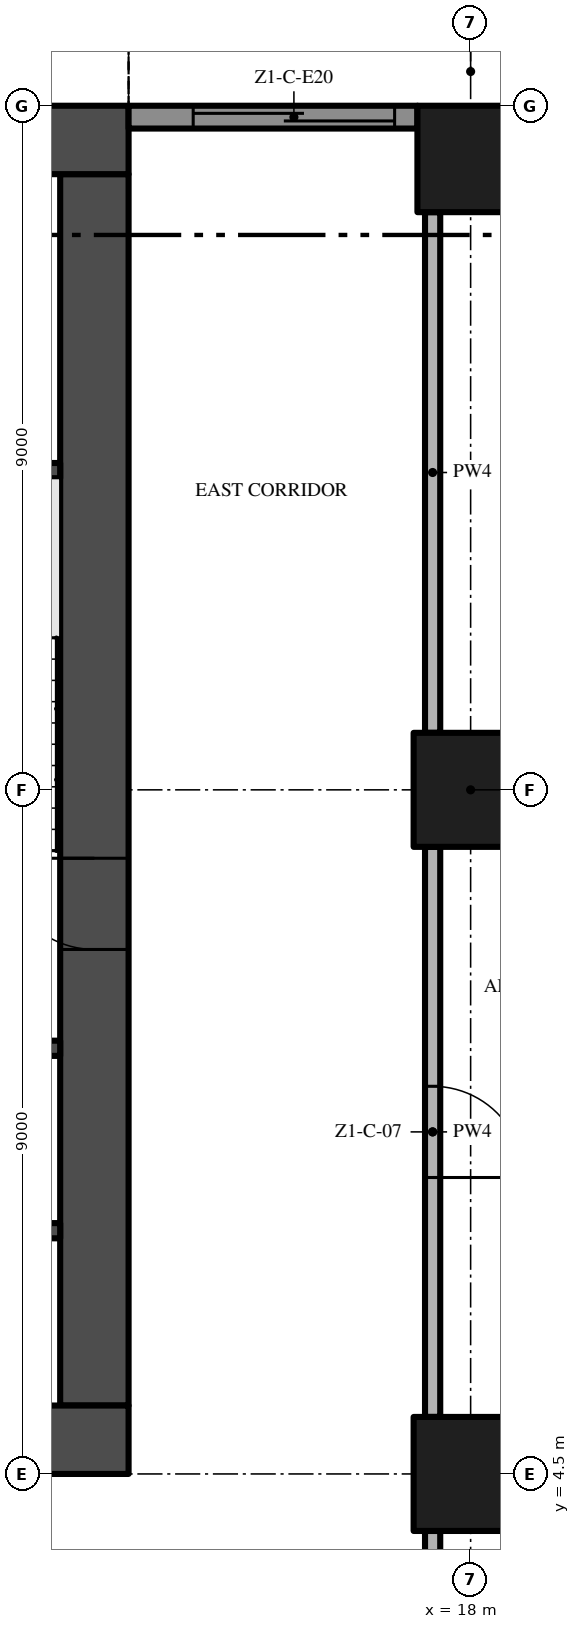
"""IFC4 building model, lengths in metres.
Left out: names, types, materials, properties, quantities, classifications, styles, units other than length and angle.
Written with IfcOpenShell. Run it as: python <this file> out.ifc"""

import sys

from ifc_helpers import new_model, si_unit, direction, frame, frame_2d, origin, origin_2d, place, context, subcontext, project, spatial, rectangle, extrude, element, fill, save


model = new_model("IFC4")
c1 = context("Model", 3, precision=1e-05, world=origin(), true_north=direction((0.0, 1.0)))
c2 = subcontext(c1, "Body", "Model", "MODEL_VIEW")
j1 = project(units=[si_unit("LENGTHUNIT", "METRE"), si_unit("PLANEANGLEUNIT", "RADIAN")], contexts=[c1])
p1 = place(None, origin())
s1 = spatial("IfcSite", under=j1, at=p1, CompositionType="ELEMENT")
p2 = place(p1, origin())
s2 = spatial("IfcBuilding", under=s1, at=p2, CompositionType="ELEMENT")
p3 = place(p2, frame((0.0, 0.0, 41.6)))
s3 = spatial("IfcBuildingStorey", under=s2, at=p3, CompositionType="ELEMENT", Elevation=41.6)
p4 = place(p3, frame((-13.5, 4.95, -0.3), z_axis=(0.0, 0.0, 1.0), x_axis=(1.0, 0.0, 0.0)))
e1 = element("IfcWall", 1, at=p4, inside=s3, PredefinedType="SHEAR", context=c2, shape_type="SweptSolid", body=[
    extrude(rectangle(XDim=27.0, YDim=0.9, at=frame_2d((13.5, 0.0))), origin(), (0.0, 0.0, 1.0), 3.8),
])
p5 = place(p4, frame((12.0, 0.0, 0.3)))
e2 = element("IfcOpeningElement", 2, at=p5, cuts=e1, PredefinedType="OPENING", context=c2, shape_type="SweptSolid", body=[
    extrude(rectangle(XDim=3.0, YDim=2.4, at=frame_2d((1.5, 1.2))), frame((0.0, 0.46, 0.0), z_axis=(0.0, -1.0, 0.0), x_axis=(1.0, 0.0, 0.0)), (0.0, 0.0, 1.0), 0.92),
])
p6 = place(p4, frame((4.9, 0.0, 0.3)))
e3 = element("IfcOpeningElement", 3, at=p6, cuts=e1, PredefinedType="OPENING", context=c2, shape_type="SweptSolid", body=[
    extrude(rectangle(XDim=1.2, YDim=2.2, at=frame_2d((0.6, 1.1))), frame((0.0, 0.46, 0.0), z_axis=(0.0, -1.0, 0.0), x_axis=(1.0, 0.0, 0.0)), (0.0, 0.0, 1.0), 0.92),
])
p7 = place(p4, frame((20.75, 0.0, 0.3)))
e4 = element("IfcOpeningElement", 4, at=p7, cuts=e1, PredefinedType="OPENING", context=c2, shape_type="SweptSolid", body=[
    extrude(rectangle(XDim=1.5, YDim=2.2, at=frame_2d((0.75, 1.1))), frame((0.0, 0.46, 0.0), z_axis=(0.0, -1.0, 0.0), x_axis=(1.0, 0.0, 0.0)), (0.0, 0.0, 1.0), 0.92),
])
p8 = place(p4, frame((17.4, 0.0, 0.3)))
e5 = element("IfcOpeningElement", 5, at=p8, cuts=e1, PredefinedType="OPENING", context=c2, shape_type="SweptSolid", body=[
    extrude(rectangle(XDim=1.2, YDim=2.2, at=frame_2d((0.6, 1.1))), frame((0.0, 0.46, 0.0), z_axis=(0.0, -1.0, 0.0), x_axis=(1.0, 0.0, 0.0)), (0.0, 0.0, 1.0), 0.92),
])
p9 = place(p3, frame((13.05, 5.4, -0.3), z_axis=(0.0, 0.0, 1.0), x_axis=(0.0, 1.0, 0.0)))
e6 = element("IfcWall", 6, at=p9, inside=s3, PredefinedType="SHEAR", context=c2, shape_type="SweptSolid", body=[
    extrude(rectangle(XDim=16.2, YDim=0.9, at=frame_2d((8.1, 0.0))), origin(), (0.0, 0.0, 1.0), 3.8),
])
p10 = place(p9, frame((6.0, 0.0, 0.3)))
e7 = element("IfcOpeningElement", 7, at=p10, cuts=e6, PredefinedType="OPENING", context=c2, shape_type="SweptSolid", body=[
    extrude(rectangle(XDim=1.2, YDim=2.2, at=frame_2d((0.6, 1.1))), frame((0.0, 0.46, 0.0), z_axis=(0.0, -1.0, 0.0), x_axis=(1.0, 0.0, 0.0)), (0.0, 0.0, 1.0), 0.92),
])
p11 = place(p3, frame((13.5, 22.05, -0.3), z_axis=(0.0, 0.0, 1.0), x_axis=(-1.0, 0.0, 0.0)))
e8 = element("IfcWall", 8, at=p11, inside=s3, PredefinedType="SHEAR", context=c2, shape_type="SweptSolid", body=[
    extrude(rectangle(XDim=27.0, YDim=0.9, at=frame_2d((13.5, 0.0))), origin(), (0.0, 0.0, 1.0), 3.8),
])
p12 = place(p3, frame((18.0, 13.5, 0.0), z_axis=(0.0, 0.0, 1.0), x_axis=(1.0, 0.0, 0.0)))
e9 = element("IfcColumn", 9, at=p12, inside=s3, PredefinedType="COLUMN", context=c2, shape_type="SweptSolid", body=[
    extrude(rectangle(XDim=1.5, YDim=1.5, at=origin_2d()), origin(), (0.0, 0.0, 1.0), 3.5),
])
p13 = place(p3, frame((18.0, 21.8, 0.0), z_axis=(0.0, 0.0, 1.0), x_axis=(1.0, 0.0, 0.0)))
e10 = element("IfcColumn", 10, at=p13, inside=s3, PredefinedType="COLUMN", context=c2, shape_type="SweptSolid", body=[
    extrude(rectangle(XDim=1.4, YDim=1.4, at=origin_2d()), origin(), (0.0, 0.0, 1.0), 3.5),
])
p14 = place(p3, frame((18.0, 4.5, 0.0), z_axis=(0.0, 0.0, 1.0), x_axis=(1.0, 0.0, 0.0)))
e11 = element("IfcColumn", 11, at=p14, inside=s3, PredefinedType="COLUMN", context=c2, shape_type="SweptSolid", body=[
    extrude(rectangle(XDim=1.5, YDim=1.5, at=origin_2d()), origin(), (0.0, 0.0, 1.0), 3.5),
])
p15 = place(p3, frame((13.5, 22.35, 0.0), z_axis=(0.0, 0.0, 1.0), x_axis=(1.0, 0.0, 0.0)))
e12 = element("IfcWall", 12, at=p15, inside=s3, PredefinedType="SOLIDWALL", context=c2, shape_type="SweptSolid", body=[
    extrude(rectangle(XDim=3.8, YDim=0.3, at=frame_2d((1.9, 0.0))), origin(), (0.0, 0.0, 1.0), 3.5),
])
p16 = place(p15, frame((0.85, 0.0, 0.0)))
e13 = element("IfcOpeningElement", 13, at=p16, cuts=e12, PredefinedType="OPENING", context=c2, shape_type="SweptSolid", body=[
    extrude(rectangle(XDim=2.65, YDim=2.4, at=frame_2d((1.325, 1.2))), frame((0.0, 0.16, 0.0), z_axis=(0.0, -1.0, 0.0), x_axis=(1.0, 0.0, 0.0)), (0.0, 0.0, 1.0), 0.32),
])
for number, where, z_axis, x_axis in (
    (14, (9.65, 7.7, 0.0), (0.0, 0.0, 1.0), (1.0, 0.0, 0.0)),
    (15, (9.65, 10.1, 0.0), (0.0, 0.0, 1.0), (1.0, 0.0, 0.0)),
    (16, (9.65, 17.7, 0.0), (0.0, 0.0, 1.0), (1.0, 0.0, 0.0)),
):
    element("IfcWall", number, at=place(p3, frame(where, z_axis=z_axis, x_axis=x_axis)), inside=s3, PredefinedType="SHEAR", context=c2, shape_type="SweptSolid", body=[
        extrude(rectangle(XDim=2.95, YDim=0.2, at=frame_2d((1.475, 0.0))), origin(), (0.0, 0.0, 1.0), 3.5),
    ])
p17 = place(p3, frame((17.5, -0.2, 0.0), z_axis=(0.0, 0.0, 1.0), x_axis=(0.0, 1.0, 0.0)))
e17 = element("IfcWall", 17, at=p17, inside=s3, PredefinedType="PARTITIONING", context=c2, shape_type="SweptSolid", body=[
    extrude(rectangle(XDim=3.95, YDim=0.2, at=frame_2d((1.975, 0.0))), origin(), (0.0, 0.0, 1.0), 3.5),
])
p18 = place(p3, frame((17.5, 12.75, 0.0), z_axis=(0.0, 0.0, 1.0), x_axis=(0.0, -1.0, 0.0)))
e18 = element("IfcWall", 18, at=p18, inside=s3, PredefinedType="PARTITIONING", context=c2, shape_type="SweptSolid", body=[
    extrude(rectangle(XDim=7.5, YDim=0.2, at=frame_2d((3.75, 0.0))), origin(), (0.0, 0.0, 1.0), 3.5),
])
p19 = place(p18, frame((3.15, 0.0, 0.0)))
e19 = element("IfcOpeningElement", 19, at=p19, cuts=e18, PredefinedType="OPENING", context=c2, shape_type="SweptSolid", body=[
    extrude(rectangle(XDim=1.2, YDim=2.4, at=frame_2d((0.6, 1.2))), frame((0.0, 0.11, 0.0), z_axis=(0.0, -1.0, 0.0), x_axis=(1.0, 0.0, 0.0)), (0.0, 0.0, 1.0), 0.22),
])
p20 = place(p3, frame((17.5, 14.25, 0.0), z_axis=(0.0, 0.0, 1.0), x_axis=(0.0, 1.0, 0.0)))
e20 = element("IfcWall", 20, at=p20, inside=s3, PredefinedType="PARTITIONING", context=c2, shape_type="SweptSolid", body=[
    extrude(rectangle(XDim=6.85, YDim=0.2, at=frame_2d((3.425, 0.0))), origin(), (0.0, 0.0, 1.0), 3.5),
])
p21 = place(p16, origin())
e21 = element("IfcDoor", 21, at=p21, inside=s3, OperationType="SINGLE_SWING_LEFT", PredefinedType="DOOR", context=c2, shape_type="SweptSolid", body=[
    extrude(rectangle(XDim=2.65, YDim=2.4, at=frame_2d((1.325, 1.2))), frame((0.0, 0.025, 0.0), z_axis=(0.0, -1.0, 0.0), x_axis=(1.0, 0.0, 0.0)), (0.0, 0.0, 1.0), 0.05),
])
fill(e13, e21)
p22 = place(p10, frame((1.2, 0.0, 0.0), z_axis=(0.0, 0.0, 1.0), x_axis=(-1.0, 0.0, 0.0)))
e22 = element("IfcDoor", 22, at=p22, inside=s3, OperationType="SINGLE_SWING_LEFT", PredefinedType="DOOR", context=c2, shape_type="SweptSolid", body=[
    extrude(rectangle(XDim=1.2, YDim=2.2, at=frame_2d((0.6, 1.1))), frame((0.0, 0.025, 0.0), z_axis=(0.0, -1.0, 0.0), x_axis=(1.0, 0.0, 0.0)), (0.0, 0.0, 1.0), 0.05),
])
fill(e7, e22)
p23 = place(p19, origin())
e23 = element("IfcDoor", 23, at=p23, inside=s3, OperationType="SINGLE_SWING_RIGHT", PredefinedType="DOOR", context=c2, shape_type="SweptSolid", body=[
    extrude(rectangle(XDim=1.2, YDim=2.4, at=frame_2d((0.6, 1.2))), frame((0.0, 0.025, 0.0), z_axis=(0.0, -1.0, 0.0), x_axis=(1.0, 0.0, 0.0)), (0.0, 0.0, 1.0), 0.05),
])
fill(e19, e23)
save(model, sys.argv[1])
